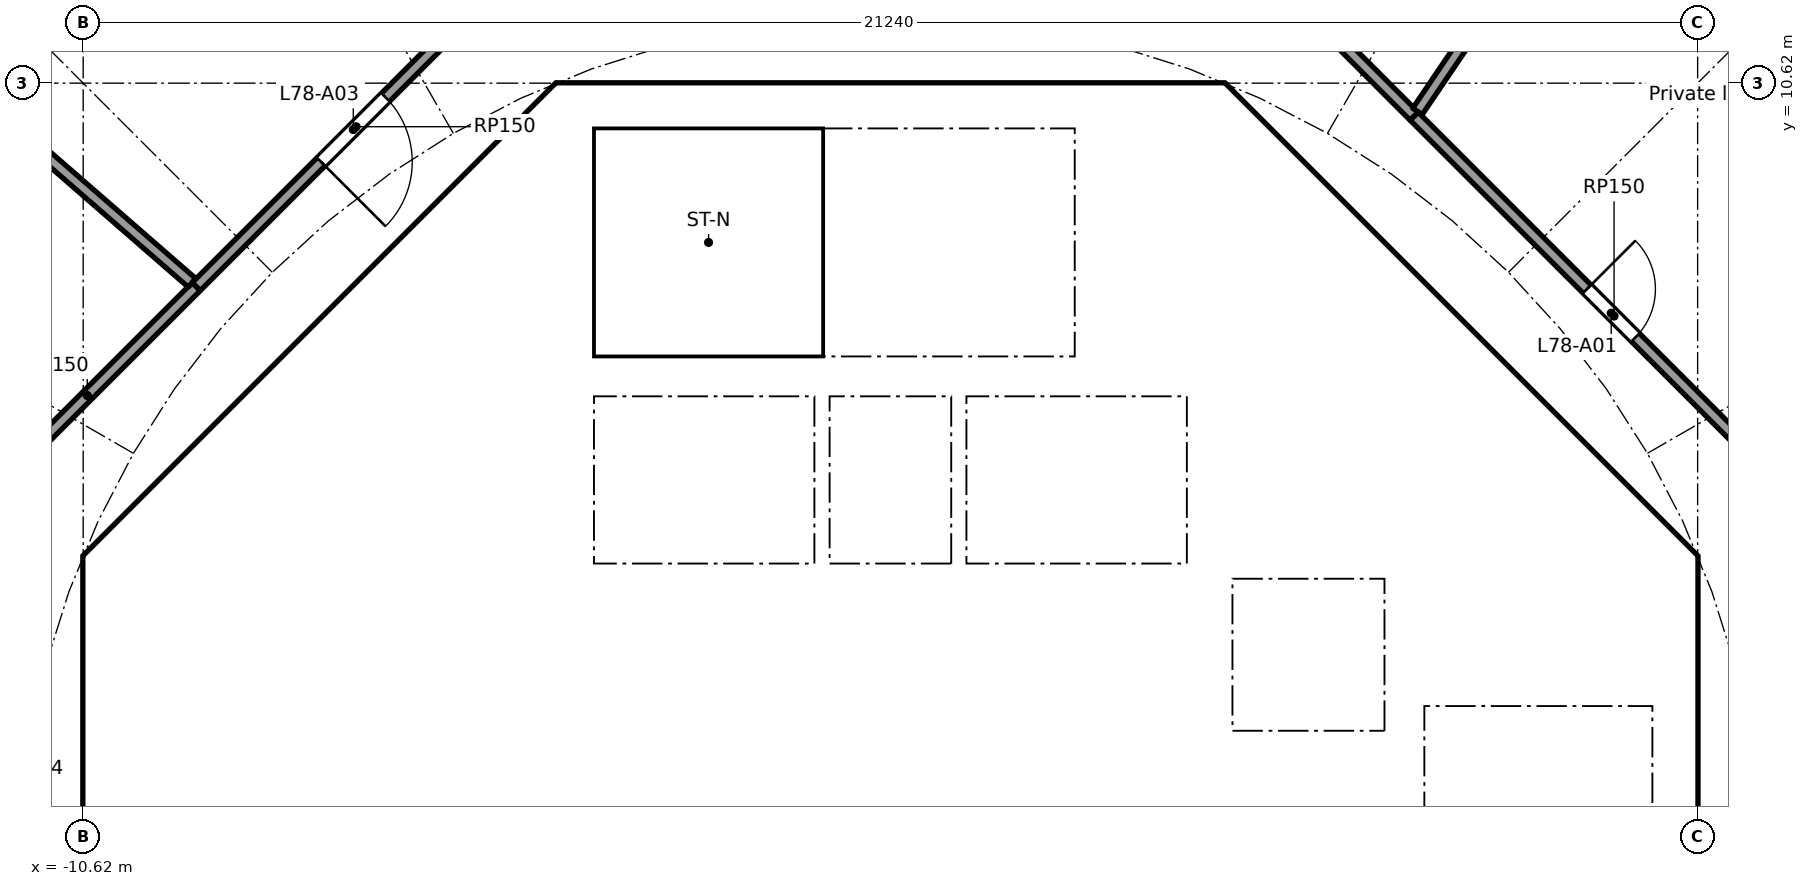
"""IFC4 building model, lengths in metres.
Left out: names, types, materials, properties, quantities, classifications, styles, units other than length and angle.
Written with IfcOpenShell. Run it as: python <this file> out.ifc"""

import sys

from ifc_helpers import new_model, si_unit, direction, frame, frame_2d, origin, place, context, subcontext, project, spatial, polyline, rectangle, outline, extrude, element, fill, save


model = new_model("IFC4")
c1 = context("Model", 3, precision=1e-05, world=origin(), true_north=direction((0.0, 1.0)))
c2 = subcontext(c1, "Body", "Model", "MODEL_VIEW")
j1 = project(units=[si_unit("LENGTHUNIT", "METRE"), si_unit("PLANEANGLEUNIT", "RADIAN")], contexts=[c1])
p1 = place(None, origin())
s1 = spatial("IfcSite", under=j1, at=p1, CompositionType="ELEMENT")
p2 = place(p1, origin())
s2 = spatial("IfcBuilding", under=s1, at=p2, CompositionType="ELEMENT")
p3 = place(p2, frame((0.0, 0.0, 315.9)))
s3 = spatial("IfcBuildingStorey", under=s2, at=p3, CompositionType="ELEMENT", Elevation=315.9)
p4 = place(p3, frame((9.988, 4.613, 0.0), z_axis=(0.0, 0.0, 1.0), x_axis=(-0.707106781187, 0.707106781187, 0.0)))
e1 = element("IfcWall", 1, at=p4, inside=s3, PredefinedType="SHEAR", context=c2, shape_type="SweptSolid", body=[
    extrude(rectangle(XDim=7.602, YDim=0.6, at=frame_2d((3.801, 0.0))), origin(), (0.0, 0.0, 1.0), 4.2),
])
p5 = place(p4, frame((3.201, 0.0, 0.0)))
e2 = element("IfcOpeningElement", 2, at=p5, cuts=e1, PredefinedType="OPENING", context=c2, shape_type="SweptSolid", body=[
    extrude(rectangle(XDim=1.2, YDim=2.1, at=frame_2d((0.6, 1.05))), frame((0.0, 0.31, 0.0), z_axis=(0.0, -1.0, 0.0), x_axis=(1.0, 0.0, 0.0)), (0.0, 0.0, 1.0), 0.62),
])
p6 = place(p3, frame((-4.613, 9.988, 0.0), z_axis=(0.0, 0.0, 1.0), x_axis=(-0.707106781187, -0.707106781187, 0.0)))
e3 = element("IfcWall", 3, at=p6, inside=s3, PredefinedType="SHEAR", context=c2, shape_type="SweptSolid", body=[
    extrude(rectangle(XDim=7.602, YDim=0.6, at=frame_2d((3.801, 0.0))), origin(), (0.0, 0.0, 1.0), 4.2),
])
p7 = place(p6, frame((0.351, 0.0, 0.0)))
e4 = element("IfcOpeningElement", 4, at=p7, cuts=e3, PredefinedType="OPENING", context=c2, shape_type="SweptSolid", body=[
    extrude(rectangle(XDim=1.1, YDim=2.1, at=frame_2d((0.55, 1.05))), frame((0.0, 0.31, 0.0), z_axis=(0.0, -1.0, 0.0), x_axis=(1.0, 0.0, 0.0)), (0.0, 0.0, 1.0), 0.62),
])
p8 = place(p3, frame((-10.325, 3.801, 0.0), z_axis=(0.0, 0.0, 1.0), x_axis=(0.0, -1.0, 0.0)))
e5 = element("IfcWall", 5, at=p8, inside=s3, PredefinedType="SHEAR", context=c2, shape_type="SweptSolid", body=[
    extrude(rectangle(XDim=7.602, YDim=0.6, at=frame_2d((3.801, 0.0))), origin(), (0.0, 0.0, 1.0), 4.2),
])
p9 = place(p8, frame((0.651, 0.0, 0.0)))
e6 = element("IfcOpeningElement", 6, at=p9, cuts=e5, PredefinedType="OPENING", context=c2, shape_type="SweptSolid", body=[
    extrude(rectangle(XDim=1.5, YDim=2.1, at=frame_2d((0.75, 1.05))), frame((0.0, 0.31, 0.0), z_axis=(0.0, -1.0, 0.0), x_axis=(1.0, 0.0, 0.0)), (0.0, 0.0, 1.0), 0.62),
])
p10 = place(p8, frame((5.451, 0.0, 0.0)))
e7 = element("IfcOpeningElement", 7, at=p10, cuts=e5, PredefinedType="OPENING", context=c2, shape_type="SweptSolid", body=[
    extrude(rectangle(XDim=1.5, YDim=2.1, at=frame_2d((0.75, 1.05))), frame((0.0, 0.31, 0.0), z_axis=(0.0, -1.0, 0.0), x_axis=(1.0, 0.0, 0.0)), (0.0, 0.0, 1.0), 0.62),
])
p11 = place(p3, frame((-7.0, 4.1, 0.0), z_axis=(0.0, 0.0, 1.0), x_axis=(0.0, 1.0, 0.0)))
e8 = element("IfcWall", 8, at=p11, inside=s3, PredefinedType="PARTITIONING", context=c2, shape_type="SweptSolid", body=[
    extrude(rectangle(XDim=2.927, YDim=0.15, at=frame_2d((1.463, 0.0))), origin(), (0.0, 0.0, 1.0), 4.2),
])
p12 = place(p11, frame((1.051, 0.0, 0.0)))
e9 = element("IfcOpeningElement", 9, at=p12, cuts=e8, PredefinedType="OPENING", context=c2, shape_type="SweptSolid", body=[
    extrude(rectangle(XDim=0.9, YDim=2.1, at=frame_2d((0.45, 1.05))), frame((0.0, 0.085, 0.0), z_axis=(0.0, -1.0, 0.0), x_axis=(1.0, 0.0, 0.0)), (0.0, 0.0, 1.0), 0.17),
])
p13 = place(p3, frame((4.0, 4.3, 0.0), z_axis=(0.0, 0.0, 1.0), x_axis=(0.0, 1.0, 0.0)))
e10 = element("IfcWall", 10, at=p13, inside=s3, PredefinedType="SOLIDWALL", context=c2, shape_type="SweptSolid", body=[
    extrude(rectangle(XDim=2.2, YDim=0.2, at=frame_2d((1.1, 0.0))), origin(), (0.0, 0.0, 1.0), 4.2),
])
p14 = place(p13, frame((0.55, 0.0, 0.0)))
e11 = element("IfcOpeningElement", 11, at=p14, cuts=e10, PredefinedType="OPENING", context=c2, shape_type="SweptSolid", body=[
    extrude(rectangle(XDim=1.1, YDim=2.1, at=frame_2d((0.55, 1.05))), frame((0.0, 0.11, 0.0), z_axis=(0.0, -1.0, 0.0), x_axis=(1.0, 0.0, 0.0)), (0.0, 0.0, 1.0), 0.22),
])
p15 = place(p3, frame((-4.0, 4.3, 0.0), z_axis=(0.0, 0.0, 1.0), x_axis=(0.0, 1.0, 0.0)))
e12 = element("IfcWall", 12, at=p15, inside=s3, PredefinedType="SOLIDWALL", context=c2, shape_type="SweptSolid", body=[
    extrude(rectangle(XDim=2.2, YDim=0.2, at=frame_2d((1.1, 0.0))), origin(), (0.0, 0.0, 1.0), 4.2),
])
p16 = place(p15, frame((0.55, 0.0, 0.0)))
e13 = element("IfcOpeningElement", 13, at=p16, cuts=e12, PredefinedType="OPENING", context=c2, shape_type="SweptSolid", body=[
    extrude(rectangle(XDim=1.1, YDim=2.1, at=frame_2d((0.55, 1.05))), frame((0.0, 0.11, 0.0), z_axis=(0.0, -1.0, 0.0), x_axis=(1.0, 0.0, 0.0)), (0.0, 0.0, 1.0), 0.22),
])
p17 = place(p3, frame((-6.7, 2.0, 0.0), z_axis=(0.0, 0.0, 1.0), x_axis=(1.0, 0.0, 0.0)))
e14 = element("IfcWall", 14, at=p17, inside=s3, PredefinedType="SOLIDWALL", context=c2, shape_type="SweptSolid", body=[
    extrude(rectangle(XDim=13.4, YDim=0.2, at=frame_2d((6.7, 0.0))), origin(), (0.0, 0.0, 1.0), 4.2),
])
p18 = place(p17, frame((11.65, 0.0, 0.0)))
e15 = element("IfcOpeningElement", 15, at=p18, cuts=e14, PredefinedType="OPENING", context=c2, shape_type="SweptSolid", body=[
    extrude(rectangle(XDim=1.1, YDim=2.1, at=frame_2d((0.55, 1.05))), frame((0.0, 0.11, 0.0), z_axis=(0.0, -1.0, 0.0), x_axis=(1.0, 0.0, 0.0)), (0.0, 0.0, 1.0), 0.22),
])
p19 = place(p17, frame((0.75, 0.0, 0.0)))
e16 = element("IfcOpeningElement", 16, at=p19, cuts=e14, PredefinedType="OPENING", context=c2, shape_type="SweptSolid", body=[
    extrude(rectangle(XDim=0.9, YDim=2.1, at=frame_2d((0.45, 1.05))), frame((0.0, 0.11, 0.0), z_axis=(0.0, -1.0, 0.0), x_axis=(1.0, 0.0, 0.0)), (0.0, 0.0, 1.0), 0.22),
])
p20 = place(p17, frame((4.05, 0.0, 0.0)))
e17 = element("IfcOpeningElement", 17, at=p20, cuts=e14, PredefinedType="OPENING", context=c2, shape_type="SweptSolid", body=[
    extrude(rectangle(XDim=0.9, YDim=2.1, at=frame_2d((0.45, 1.05))), frame((0.0, 0.11, 0.0), z_axis=(0.0, -1.0, 0.0), x_axis=(1.0, 0.0, 0.0)), (0.0, 0.0, 1.0), 0.22),
])
p21 = place(p17, frame((7.35, 0.0, 0.0)))
e18 = element("IfcOpeningElement", 18, at=p21, cuts=e14, PredefinedType="OPENING", context=c2, shape_type="SweptSolid", body=[
    extrude(rectangle(XDim=0.9, YDim=2.1, at=frame_2d((0.45, 1.05))), frame((0.0, 0.11, 0.0), z_axis=(0.0, -1.0, 0.0), x_axis=(1.0, 0.0, 0.0)), (0.0, 0.0, 1.0), 0.22),
])
p22 = place(p17, frame((9.55, 0.0, 0.0)))
e19 = element("IfcOpeningElement", 19, at=p22, cuts=e14, PredefinedType="OPENING", context=c2, shape_type="SweptSolid", body=[
    extrude(rectangle(XDim=0.9, YDim=2.1, at=frame_2d((0.45, 1.05))), frame((0.0, 0.11, 0.0), z_axis=(0.0, -1.0, 0.0), x_axis=(1.0, 0.0, 0.0)), (0.0, 0.0, 1.0), 0.22),
])
p23 = place(p3, frame((6.7, 4.0, 0.0), z_axis=(0.0, 0.0, 1.0), x_axis=(1.0, 0.0, 0.0)))
e20 = element("IfcWall", 20, at=p23, inside=s3, PredefinedType="SOLIDWALL", context=c2, shape_type="SweptSolid", body=[
    extrude(rectangle(XDim=3.325, YDim=0.2, at=frame_2d((1.662, 0.0))), origin(), (0.0, 0.0, 1.0), 4.2),
])
p24 = place(p23, frame((1.25, 0.0, 0.0)))
e21 = element("IfcOpeningElement", 21, at=p24, cuts=e20, PredefinedType="OPENING", context=c2, shape_type="SweptSolid", body=[
    extrude(rectangle(XDim=1.1, YDim=2.1, at=frame_2d((0.55, 1.05))), frame((0.0, 0.11, 0.0), z_axis=(0.0, -1.0, 0.0), x_axis=(1.0, 0.0, 0.0)), (0.0, 0.0, 1.0), 0.22),
])
p25 = place(p3, frame((4.0, 7.025, 0.0), z_axis=(0.0, 0.0, 1.0), x_axis=(0.0, 1.0, 0.0)))
e22 = element("IfcWall", 22, at=p25, inside=s3, PredefinedType="SOLIDWALL", context=c2, shape_type="SweptSolid", body=[
    extrude(rectangle(XDim=3.0, YDim=0.2, at=frame_2d((1.5, 0.0))), origin(), (0.0, 0.0, 1.0), 4.2),
])
p26 = place(p25, frame((0.925, 0.0, 0.0)))
e23 = element("IfcOpeningElement", 23, at=p26, cuts=e22, PredefinedType="OPENING", context=c2, shape_type="SweptSolid", body=[
    extrude(rectangle(XDim=1.1, YDim=2.1, at=frame_2d((0.55, 1.05))), frame((0.0, 0.11, 0.0), z_axis=(0.0, -1.0, 0.0), x_axis=(1.0, 0.0, 0.0)), (0.0, 0.0, 1.0), 0.22),
])
p27 = place(p3, origin())
e24 = element("IfcWall", 24, at=p27, inside=s3, PredefinedType="SHEAR", context=c2, shape_type="SweptSolid", body=[
    extrude(outline(polyline([(-10.2, 4.825), (-9.776, 4.401), (-10.025, 4.152), (-10.025, 3.801), (-10.625, 3.801), (-10.625, 4.401), (-10.2, 4.825)])), origin(), (0.0, 0.0, 1.0), 4.2),
])
p28 = place(p3, origin())
e25 = element("IfcWall", 25, at=p28, inside=s3, PredefinedType="SHEAR", context=c2, shape_type="SweptSolid", body=[
    extrude(outline(polyline([(-4.152, 10.025), (-4.401, 9.776), (-4.825, 10.2), (-4.401, 10.625), (4.401, 10.625), (4.825, 10.2), (4.401, 9.776), (4.152, 10.025), (-4.152, 10.025)])), origin(), (0.0, 0.0, 1.0), 4.2),
])
p29 = place(p3, origin())
e26 = element("IfcWall", 26, at=p29, inside=s3, PredefinedType="SHEAR", context=c2, shape_type="SweptSolid", body=[
    extrude(outline(polyline([(9.776, -4.401), (10.025, -4.152), (10.025, -3.801), (10.025, 4.152), (9.776, 4.401), (10.2, 4.825), (10.625, 4.401), (10.625, -4.401), (10.2, -4.825), (9.776, -4.401)])), origin(), (0.0, 0.0, 1.0), 4.2),
])
for number, where, z_axis, x_axis in (
    (27, (-0.9, 4.3, 0.0), (0.0, 0.0, 1.0), (0.0, 1.0, 0.0)),
    (28, (0.9, 4.3, 0.0), (0.0, 0.0, 1.0), (0.0, 1.0, 0.0)),
):
    element("IfcWall", number, at=place(p3, frame(where, z_axis=z_axis, x_axis=x_axis)), inside=s3, PredefinedType="SOLIDWALL", context=c2, shape_type="SweptSolid", body=[
        extrude(rectangle(XDim=2.2, YDim=0.2, at=frame_2d((1.1, 0.0))), origin(), (0.0, 0.0, 1.0), 4.2),
    ])
p30 = place(p3, origin())
e29 = element("IfcWall", 29, at=p30, inside=s3, PredefinedType="SOLIDWALL", context=c2, shape_type="SweptSolid", body=[
    extrude(outline(polyline([(-6.7, 4.3), (6.7, 4.3), (6.7, 2.1), (6.5, 2.1), (6.5, 4.1), (4.5, 4.1), (4.5, 2.1), (4.3, 2.1), (4.3, 4.1), (2.3, 4.1), (2.3, 2.1), (2.1, 2.1), (2.1, 4.1), (0.1, 4.1), (0.1, 2.1), (-0.1, 2.1), (-0.1, 4.1), (-4.3, 4.1), (-4.3, 2.1), (-4.5, 2.1), (-4.5, 4.1), (-6.5, 4.1), (-6.5, 2.1), (-6.7, 2.1), (-6.7, 4.3)])), origin(), (0.0, 0.0, 1.0), 4.2),
])
p31 = place(p3, frame((-10.025, 4.0, 0.0), z_axis=(0.0, 0.0, 1.0), x_axis=(1.0, 0.0, 0.0)))
e30 = element("IfcWall", 30, at=p31, inside=s3, PredefinedType="PARTITIONING", context=c2, shape_type="SweptSolid", body=[
    extrude(rectangle(XDim=3.325, YDim=0.2, at=frame_2d((1.662, 0.0))), origin(), (0.0, 0.0, 1.0), 4.2),
])
p32 = place(p3, origin())
e31 = element("IfcWall", 31, at=p32, inside=s3, PredefinedType="SOLIDWALL", context=c2, shape_type="SweptSolid", body=[
    extrude(outline(polyline([(-3.9, 7.025), (-4.1, 7.025), (-4.1, 10.025), (-3.9, 10.025), (-3.9, 7.025)])), origin(), (0.0, 0.0, 1.0), 4.2),
])
p33 = place(p3, origin())
e32 = element("IfcWall", 32, at=p33, inside=s3, PredefinedType="SOLIDWALL", context=c2, shape_type="SweptSolid", body=[
    extrude(outline(polyline([(4.1, 6.5), (-4.1, 6.5), (-4.1, 7.025), (4.1, 7.025), (4.1, 6.5)])), origin(), (0.0, 0.0, 1.0), 4.2),
])
p34 = place(p3, origin())
e33 = element("IfcWall", 33, at=p34, inside=s3, PredefinedType="SOLIDWALL", context=c2, shape_type="SweptSolid", body=[
    extrude(outline(polyline([(7.025, -3.9), (6.7, -3.9), (6.7, 3.9), (7.025, 3.9), (7.025, -3.9)])), origin(), (0.0, 0.0, 1.0), 4.2),
])
p35 = place(p3, frame((-12.0, 5.077, 0.0), z_axis=(0.0, 0.0, 1.0), x_axis=(0.707197078955, 0.707016471886, 0.0)))
e34 = element("IfcWall", 34, at=p35, inside=s3, PredefinedType="PARTITIONING", context=c2, shape_type="SweptSolid", body=[
    extrude(rectangle(XDim=4.055, YDim=0.15, at=frame_2d((2.028, 0.0))), origin(), (0.0, 0.0, 1.0), 4.2),
])
p36 = place(p3, frame((-9.189, 7.993, 0.0), z_axis=(0.0, 0.0, 1.0), x_axis=(-0.754481157007, 0.656321707489, 0.0)))
e35 = element("IfcWall", 35, at=p36, inside=s3, PredefinedType="PARTITIONING", context=c2, shape_type="SweptSolid", body=[
    extrude(rectangle(XDim=7.016, YDim=0.15, at=frame_2d((3.508, 0.0))), origin(), (0.0, 0.0, 1.0), 4.2),
])
p37 = place(p3, frame((-9.132, 7.944, 0.0), z_axis=(0.0, 0.0, 1.0), x_axis=(0.707127303506, 0.707086258271, 0.0)))
e36 = element("IfcWall", 36, at=p37, inside=s3, PredefinedType="PARTITIONING", context=c2, shape_type="SweptSolid", body=[
    extrude(rectangle(XDim=5.948, YDim=0.15, at=frame_2d((2.974, 0.0))), origin(), (0.0, 0.0, 1.0), 4.2),
])
p38 = place(p37, frame((2.321, 0.0, 0.0)))
e37 = element("IfcOpeningElement", 37, at=p38, cuts=e36, PredefinedType="OPENING", context=c2, shape_type="SweptSolid", body=[
    extrude(rectangle(XDim=1.2, YDim=2.1, at=frame_2d((0.6, 1.05))), frame((0.0, 0.085, 0.0), z_axis=(0.0, -1.0, 0.0), x_axis=(1.0, 0.0, 0.0)), (0.0, 0.0, 1.0), 0.17),
])
p39 = place(p3, frame((5.077, 12.0, 0.0), z_axis=(0.0, 0.0, 1.0), x_axis=(0.706964061082, -0.707249472491, 0.0)))
e38 = element("IfcWall", 38, at=p39, inside=s3, PredefinedType="PARTITIONING", context=c2, shape_type="SweptSolid", body=[
    extrude(rectangle(XDim=2.566, YDim=0.15, at=frame_2d((1.283, 0.0))), origin(), (0.0, 0.0, 1.0), 4.2),
])
p40 = place(p3, frame((6.934, 10.248, 0.0), z_axis=(0.0, 0.0, 1.0), x_axis=(0.56046251301, 0.828179794194, 0.0)))
e39 = element("IfcWall", 39, at=p40, inside=s3, PredefinedType="PARTITIONING", context=c2, shape_type="SweptSolid", body=[
    extrude(rectangle(XDim=7.462, YDim=0.15, at=frame_2d((3.731, 0.0))), origin(), (0.0, 0.0, 1.0), 4.2),
])
p41 = place(p3, frame((6.891, 10.185, 0.0), z_axis=(0.0, 0.0, 1.0), x_axis=(0.70715602432, -0.707057534623, 0.0)))
e40 = element("IfcWall", 40, at=p41, inside=s3, PredefinedType="PARTITIONING", context=c2, shape_type="SweptSolid", body=[
    extrude(rectangle(XDim=7.437, YDim=0.15, at=frame_2d((3.718, 0.0))), origin(), (0.0, 0.0, 1.0), 4.2),
])
p42 = place(p41, frame((3.215, 0.0, 0.0)))
e41 = element("IfcOpeningElement", 41, at=p42, cuts=e40, PredefinedType="OPENING", context=c2, shape_type="SweptSolid", body=[
    extrude(rectangle(XDim=0.9, YDim=2.1, at=frame_2d((0.45, 1.05))), frame((0.0, 0.085, 0.0), z_axis=(0.0, -1.0, 0.0), x_axis=(1.0, 0.0, 0.0)), (0.0, 0.0, 1.0), 0.17),
])
p43 = place(p18, origin())
e42 = element("IfcDoor", 42, at=p43, inside=s3, OperationType="DOUBLE_DOOR_SLIDING", PredefinedType="DOOR", context=c2, shape_type="SweptSolid", body=[
    extrude(rectangle(XDim=1.1, YDim=2.1, at=frame_2d((0.55, 1.05))), frame((0.0, 0.025, 0.0), z_axis=(0.0, -1.0, 0.0), x_axis=(1.0, 0.0, 0.0)), (0.0, 0.0, 1.0), 0.05),
])
fill(e15, e42)
p44 = place(p14, origin())
e43 = element("IfcDoor", 43, at=p44, inside=s3, OperationType="DOUBLE_DOOR_SLIDING", PredefinedType="DOOR", context=c2, shape_type="SweptSolid", body=[
    extrude(rectangle(XDim=1.1, YDim=2.1, at=frame_2d((0.55, 1.05))), frame((0.0, 0.025, 0.0), z_axis=(0.0, -1.0, 0.0), x_axis=(1.0, 0.0, 0.0)), (0.0, 0.0, 1.0), 0.05),
])
fill(e11, e43)
p45 = place(p16, origin())
e44 = element("IfcDoor", 44, at=p45, inside=s3, OperationType="DOUBLE_DOOR_SLIDING", PredefinedType="DOOR", context=c2, shape_type="SweptSolid", body=[
    extrude(rectangle(XDim=1.1, YDim=2.1, at=frame_2d((0.55, 1.05))), frame((0.0, 0.025, 0.0), z_axis=(0.0, -1.0, 0.0), x_axis=(1.0, 0.0, 0.0)), (0.0, 0.0, 1.0), 0.05),
])
fill(e13, e44)
p46 = place(p24, frame((1.1, 0.0, 0.0), x_axis=(-1.0, 0.0, 0.0)))
e45 = element("IfcDoor", 45, at=p46, inside=s3, OperationType="SINGLE_SWING_LEFT", PredefinedType="DOOR", context=c2, shape_type="SweptSolid", body=[
    extrude(rectangle(XDim=1.1, YDim=2.1, at=frame_2d((0.55, 1.05))), frame((0.0, 0.025, 0.0), z_axis=(0.0, -1.0, 0.0), x_axis=(1.0, 0.0, 0.0)), (0.0, 0.0, 1.0), 0.05),
])
fill(e21, e45)
p47 = place(p26, origin())
e46 = element("IfcDoor", 46, at=p47, inside=s3, OperationType="SINGLE_SWING_RIGHT", PredefinedType="DOOR", context=c2, shape_type="SweptSolid", body=[
    extrude(rectangle(XDim=1.1, YDim=2.1, at=frame_2d((0.55, 1.05))), frame((0.0, 0.025, 0.0), z_axis=(0.0, -1.0, 0.0), x_axis=(1.0, 0.0, 0.0)), (0.0, 0.0, 1.0), 0.05),
])
fill(e23, e46)
p48 = place(p12, origin())
e47 = element("IfcDoor", 47, at=p48, inside=s3, OperationType="SINGLE_SWING_LEFT", PredefinedType="DOOR", context=c2, shape_type="SweptSolid", body=[
    extrude(rectangle(XDim=0.9, YDim=2.1, at=frame_2d((0.45, 1.05))), frame((0.0, 0.025, 0.0), z_axis=(0.0, -1.0, 0.0), x_axis=(1.0, 0.0, 0.0)), (0.0, 0.0, 1.0), 0.05),
])
fill(e9, e47)
p49 = place(p19, origin())
e48 = element("IfcDoor", 48, at=p49, inside=s3, OperationType="SINGLE_SWING_RIGHT", PredefinedType="DOOR", context=c2, shape_type="SweptSolid", body=[
    extrude(rectangle(XDim=0.9, YDim=2.1, at=frame_2d((0.45, 1.05))), frame((0.0, 0.025, 0.0), z_axis=(0.0, -1.0, 0.0), x_axis=(1.0, 0.0, 0.0)), (0.0, 0.0, 1.0), 0.05),
])
fill(e16, e48)
p50 = place(p20, origin())
e49 = element("IfcDoor", 49, at=p50, inside=s3, OperationType="SINGLE_SWING_RIGHT", PredefinedType="DOOR", context=c2, shape_type="SweptSolid", body=[
    extrude(rectangle(XDim=0.9, YDim=2.1, at=frame_2d((0.45, 1.05))), frame((0.0, 0.025, 0.0), z_axis=(0.0, -1.0, 0.0), x_axis=(1.0, 0.0, 0.0)), (0.0, 0.0, 1.0), 0.05),
])
fill(e17, e49)
p51 = place(p21, origin())
e50 = element("IfcDoor", 50, at=p51, inside=s3, OperationType="SINGLE_SWING_RIGHT", PredefinedType="DOOR", context=c2, shape_type="SweptSolid", body=[
    extrude(rectangle(XDim=0.9, YDim=2.1, at=frame_2d((0.45, 1.05))), frame((0.0, 0.025, 0.0), z_axis=(0.0, -1.0, 0.0), x_axis=(1.0, 0.0, 0.0)), (0.0, 0.0, 1.0), 0.05),
])
fill(e18, e50)
p52 = place(p22, origin())
e51 = element("IfcDoor", 51, at=p52, inside=s3, OperationType="SINGLE_SWING_LEFT", PredefinedType="DOOR", context=c2, shape_type="SweptSolid", body=[
    extrude(rectangle(XDim=0.9, YDim=2.1, at=frame_2d((0.45, 1.05))), frame((0.0, 0.025, 0.0), z_axis=(0.0, -1.0, 0.0), x_axis=(1.0, 0.0, 0.0)), (0.0, 0.0, 1.0), 0.05),
])
fill(e19, e51)
p53 = place(p5, origin())
e52 = element("IfcDoor", 52, at=p53, inside=s3, OperationType="SINGLE_SWING_LEFT", PredefinedType="DOOR", context=c2, shape_type="SweptSolid", body=[
    extrude(rectangle(XDim=1.2, YDim=2.1, at=frame_2d((0.6, 1.05))), frame((0.0, 0.025, 0.0), z_axis=(0.0, -1.0, 0.0), x_axis=(1.0, 0.0, 0.0)), (0.0, 0.0, 1.0), 0.05),
])
fill(e2, e52)
p54 = place(p9, origin())
e53 = element("IfcDoor", 53, at=p54, inside=s3, OperationType="DOUBLE_DOOR_SINGLE_SWING", PredefinedType="DOOR", context=c2, shape_type="SweptSolid", body=[
    extrude(rectangle(XDim=1.5, YDim=2.1, at=frame_2d((0.75, 1.05))), frame((0.0, 0.025, 0.0), z_axis=(0.0, -1.0, 0.0), x_axis=(1.0, 0.0, 0.0)), (0.0, 0.0, 1.0), 0.05),
])
fill(e6, e53)
p55 = place(p7, origin())
e54 = element("IfcDoor", 54, at=p55, inside=s3, OperationType="SINGLE_SWING_LEFT", PredefinedType="DOOR", context=c2, shape_type="SweptSolid", body=[
    extrude(rectangle(XDim=1.1, YDim=2.1, at=frame_2d((0.55, 1.05))), frame((0.0, 0.025, 0.0), z_axis=(0.0, -1.0, 0.0), x_axis=(1.0, 0.0, 0.0)), (0.0, 0.0, 1.0), 0.05),
])
fill(e4, e54)
p56 = place(p42, origin())
e55 = element("IfcDoor", 55, at=p56, inside=s3, OperationType="SINGLE_SWING_LEFT", PredefinedType="DOOR", context=c2, shape_type="SweptSolid", body=[
    extrude(rectangle(XDim=0.9, YDim=2.1, at=frame_2d((0.45, 1.05))), frame((0.0, 0.025, 0.0), z_axis=(0.0, -1.0, 0.0), x_axis=(1.0, 0.0, 0.0)), (0.0, 0.0, 1.0), 0.05),
])
fill(e41, e55)
p57 = place(p38, frame((1.2, 0.0, 0.0), x_axis=(-1.0, 0.0, 0.0)))
e56 = element("IfcDoor", 56, at=p57, inside=s3, OperationType="SINGLE_SWING_RIGHT", PredefinedType="DOOR", context=c2, shape_type="SweptSolid", body=[
    extrude(rectangle(XDim=1.2, YDim=2.1, at=frame_2d((0.6, 1.05))), frame((0.0, 0.025, 0.0), z_axis=(0.0, -1.0, 0.0), x_axis=(1.0, 0.0, 0.0)), (0.0, 0.0, 1.0), 0.05),
])
fill(e37, e56)
save(model, sys.argv[1])
